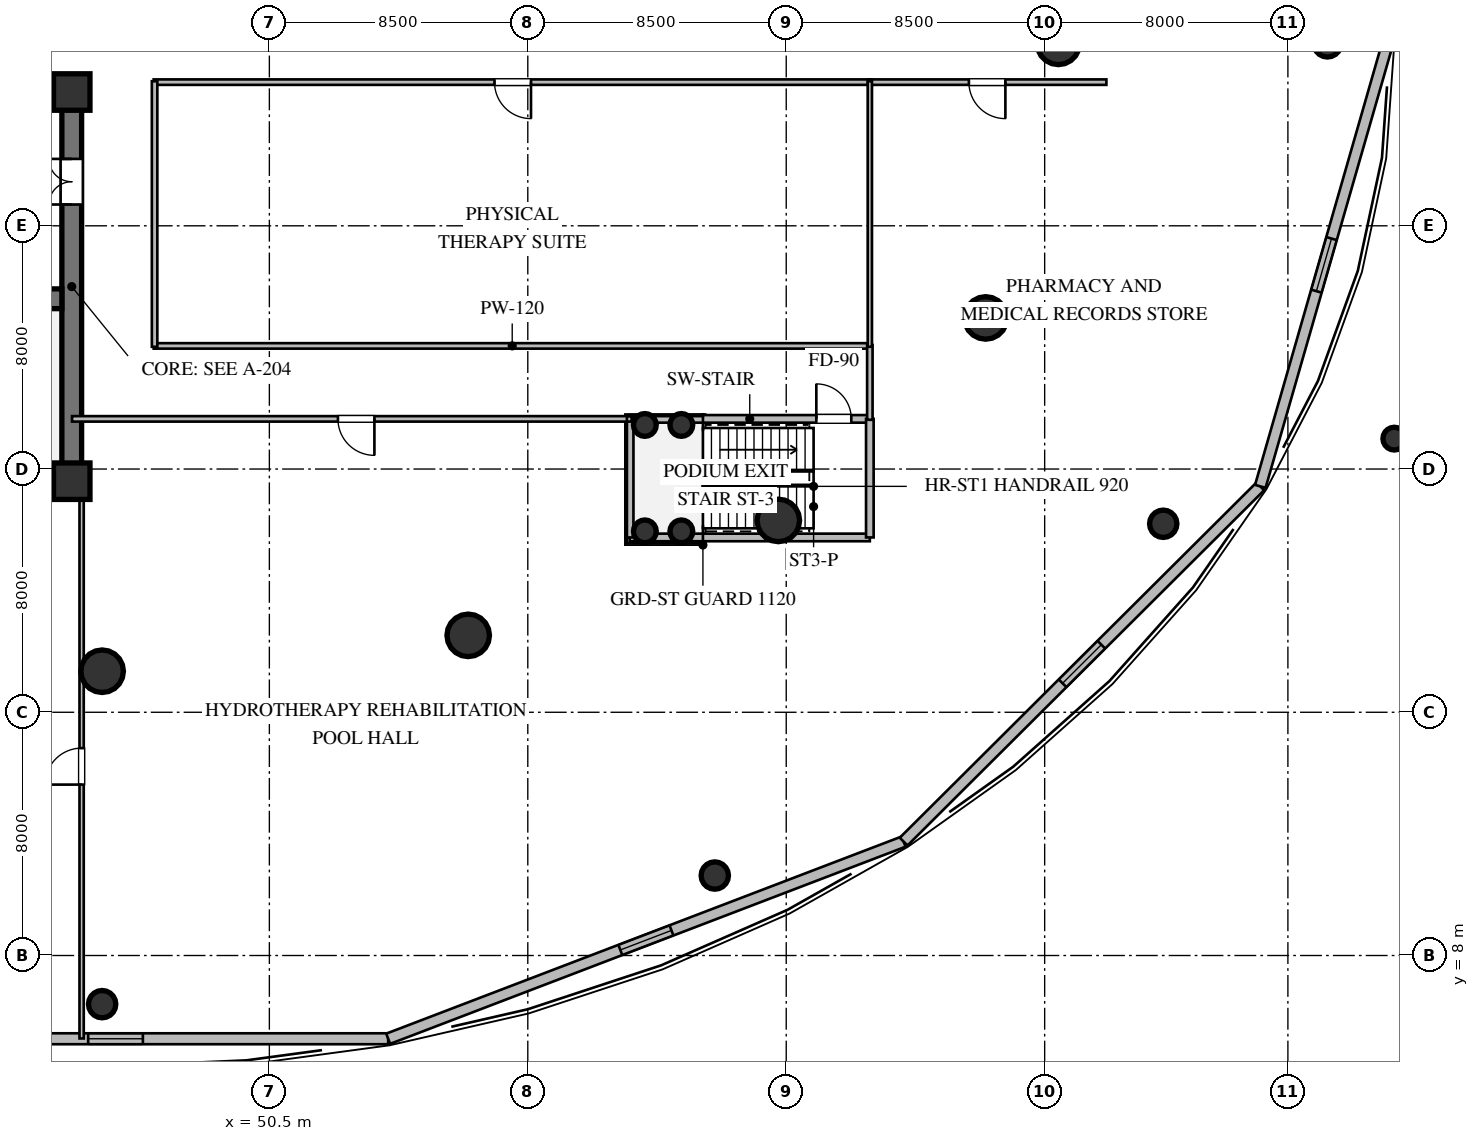
"""IFC4 building model, lengths in metres.
Left out: names, types, materials, properties, quantities, classifications, styles, units other than length and angle.
Written with IfcOpenShell. Run it as: python <this file> out.ifc"""

import sys

from ifc_helpers import new_model, si_unit, direction, frame, frame_2d, origin, origin_2d, place, context, subcontext, project, spatial, rectangle, circle, extrude, element, fill, save


model = new_model("IFC4")
c1 = context("Model", 3, precision=1e-05, world=origin(), true_north=direction((0.0, 1.0)))
c2 = subcontext(c1, "Body", "Model", "MODEL_VIEW")
j1 = project(units=[si_unit("LENGTHUNIT", "METRE"), si_unit("PLANEANGLEUNIT", "RADIAN")], contexts=[c1])
p1 = place(None, origin())
s1 = spatial("IfcSite", under=j1, at=p1, CompositionType="ELEMENT")
p2 = place(p1, origin())
s2 = spatial("IfcBuilding", under=s1, at=p2, CompositionType="ELEMENT")
p3 = place(p2, frame((0.0, 0.0, 9.6)))
s3 = spatial("IfcBuildingStorey", under=s2, at=p3, CompositionType="ELEMENT", Elevation=9.6)
for number, where, z_axis, x_axis in (
    (1, (21.675, 23.6, 0.0), (0.0, 0.0, 1.0), (1.0, 0.0, 0.0)),
    (2, (21.675, 36.4, 0.0), (0.0, 0.0, 1.0), (1.0, 0.0, 0.0)),
):
    element("IfcWall", number, at=place(p3, frame(where, z_axis=z_axis, x_axis=x_axis)), inside=s3, PredefinedType="SHEAR", context=c2, shape_type="SweptSolid", body=[
        extrude(rectangle(XDim=22.65, YDim=0.65, at=frame_2d((11.325, 0.0))), origin(), (0.0, 0.0, 1.0), 4.52),
    ])
p4 = place(p3, frame((44.0, 23.925, 0.0), z_axis=(0.0, 0.0, 1.0), x_axis=(0.0, 1.0, 0.0)))
e3 = element("IfcWall", 3, at=p4, inside=s3, PredefinedType="SHEAR", context=c2, shape_type="SweptSolid", body=[
    extrude(rectangle(XDim=12.15, YDim=0.65, at=frame_2d((6.075, 0.0))), origin(), (0.0, 0.0, 1.0), 4.52),
])
p5 = place(p4, frame((8.775, 0.0, 0.0)))
e4 = element("IfcOpeningElement", 4, at=p5, cuts=e3, PredefinedType="OPENING", context=c2, shape_type="SweptSolid", body=[
    extrude(rectangle(XDim=1.5, YDim=2.15, at=frame_2d((0.75, 1.075))), frame((0.0, 0.335, 0.0), z_axis=(0.0, -1.0, 0.0), x_axis=(1.0, 0.0, 0.0)), (0.0, 0.0, 1.0), 0.67),
])
p6 = place(p3, frame((22.325, 29.6, 0.0), z_axis=(0.0, 0.0, 1.0), x_axis=(1.0, 0.0, 0.0)))
e5 = element("IfcWall", 5, at=p6, inside=s3, PredefinedType="SHEAR", context=c2, shape_type="SweptSolid", body=[
    extrude(rectangle(XDim=21.35, YDim=0.65, at=frame_2d((10.675, 0.0))), origin(), (0.0, 0.0, 1.0), 4.52),
])
p7 = place(p6, frame((12.125, 0.0, 0.0)))
e6 = element("IfcOpeningElement", 6, at=p7, cuts=e5, PredefinedType="OPENING", context=c2, shape_type="SweptSolid", body=[
    extrude(rectangle(XDim=1.15, YDim=2.1, at=frame_2d((0.575, 1.05))), frame((0.0, 0.335, 0.0), z_axis=(0.0, -1.0, 0.0), x_axis=(1.0, 0.0, 0.0)), (0.0, 0.0, 1.0), 0.67),
])
for number, where, z_axis, x_axis in (
    (7, (44.0, 23.6, 0.0), (0.0, 0.0, 1.0), (1.0, 0.0, 0.0)),
    (8, (44.0, 36.4, 0.0), (0.0, 0.0, 1.0), (1.0, 0.0, 0.0)),
):
    element("IfcColumn", number, at=place(p3, frame(where, z_axis=z_axis, x_axis=x_axis)), inside=s3, PredefinedType="COLUMN", context=c2, shape_type="SweptSolid", body=[
        extrude(rectangle(XDim=1.2, YDim=1.2, at=origin_2d()), origin(), (0.0, 0.0, 1.0), 4.8),
    ])
for number, where, z_axis, x_axis in (
    (9, (76.45, 38.0, 0.0), (0.0, 0.0, 1.0), (1.0, 0.0, 0.0)),
    (10, (45.0, 17.35, 0.0), (0.0, 0.0, 1.0), (1.0, 0.0, 0.0)),
    (11, (57.04, 18.53, 0.0), (0.0, 0.0, 1.0), (1.0, 0.0, 0.0)),
    (12, (67.24, 22.31, 0.0), (0.0, 0.0, 1.0), (1.0, 0.0, 0.0)),
    (13, (74.06, 28.97, 0.0), (0.0, 0.0, 1.0), (1.0, 0.0, 0.0)),
):
    element("IfcColumn", number, at=place(p3, frame(where, z_axis=z_axis, x_axis=x_axis)), inside=s3, PredefinedType="COLUMN", context=c2, shape_type="SweptSolid", body=[
        extrude(circle(Radius=0.7, at=origin_2d()), origin(), (0.0, 0.0, 1.0), 4.8),
    ])
for number, where, z_axis, x_axis in (
    (14, (85.3, 38.0, 0.0), (0.0, 0.0, 1.0), (1.0, 0.0, 0.0)),
    (15, (45.0, 6.4, 0.0), (0.0, 0.0, 1.0), (1.0, 0.0, 0.0)),
    (16, (65.15, 10.63, 0.0), (0.0, 0.0, 1.0), (1.0, 0.0, 0.0)),
    (17, (79.9, 22.2, 0.0), (0.0, 0.0, 1.0), (1.0, 0.0, 0.0)),
):
    element("IfcColumn", number, at=place(p3, frame(where, z_axis=z_axis, x_axis=x_axis)), inside=s3, PredefinedType="COLUMN", context=c2, shape_type="SweptSolid", body=[
        extrude(circle(Radius=0.45, at=origin_2d()), origin(), (0.0, 0.0, 1.0), 4.8),
    ])
for number, where, z_axis, x_axis in (
    (18, (87.5, 25.0, 0.0), (0.0, 0.0, 1.0), (1.0, 0.0, 0.0)),
    (19, (62.85, 21.95, 0.0), (0.0, 0.0, 1.0), (1.0, 0.0, 0.0)),
    (20, (62.85, 25.45, 0.0), (0.0, 0.0, 1.0), (1.0, 0.0, 0.0)),
    (21, (64.05, 21.95, 0.0), (0.0, 0.0, 1.0), (1.0, 0.0, 0.0)),
    (22, (64.05, 25.45, 0.0), (0.0, 0.0, 1.0), (1.0, 0.0, 0.0)),
):
    element("IfcColumn", number, at=place(p3, frame(where, z_axis=z_axis, x_axis=x_axis)), inside=s3, PredefinedType="COLUMN", context=c2, shape_type="SweptSolid", body=[
        extrude(circle(Radius=0.375, at=origin_2d()), origin(), (0.0, 0.0, 1.0), 4.8),
    ])
p8 = place(p3, frame((35.592, 5.262, 0.0), z_axis=(0.0, 0.0, 1.0), x_axis=(1.0, 0.0, 0.0)))
e23 = element("IfcWall", 23, at=p8, inside=s3, PredefinedType="STANDARD", context=c2, shape_type="SweptSolid", body=[
    extrude(rectangle(XDim=18.816, YDim=0.36, at=frame_2d((9.408, 0.0))), origin(), (0.0, 0.0, 1.0), 4.52),
])
p9 = place(p8, frame((8.948, 0.0, 1.05)))
e24 = element("IfcOpeningElement", 24, at=p9, cuts=e23, PredefinedType="OPENING", context=c2, shape_type="SweptSolid", body=[
    extrude(rectangle(XDim=1.8, YDim=1.7, at=frame_2d((0.9, 0.85))), frame((0.0, 0.19, 0.0), z_axis=(0.0, -1.0, 0.0), x_axis=(1.0, 0.0, 0.0)), (0.0, 0.0, 1.0), 0.38),
])
p10 = place(p3, frame((54.408, 5.262, 0.0), z_axis=(0.0, 0.0, 1.0), x_axis=(0.934014086565, 0.357236176917, 0.0)))
e25 = element("IfcWall", 25, at=p10, inside=s3, PredefinedType="STANDARD", context=c2, shape_type="SweptSolid", body=[
    extrude(rectangle(XDim=18.151, YDim=0.36, at=frame_2d((9.075, 0.0))), origin(), (0.0, 0.0, 1.0), 4.52),
])
p11 = place(p10, frame((8.175, 0.0, 1.05)))
e26 = element("IfcOpeningElement", 26, at=p11, cuts=e25, PredefinedType="OPENING", context=c2, shape_type="SweptSolid", body=[
    extrude(rectangle(XDim=1.8, YDim=1.7, at=frame_2d((0.9, 0.85))), frame((0.0, 0.19, 0.0), z_axis=(0.0, -1.0, 0.0), x_axis=(1.0, 0.0, 0.0)), (0.0, 0.0, 1.0), 0.38),
])
p12 = place(p3, frame((71.361, 11.746, 0.0), z_axis=(0.0, 0.0, 1.0), x_axis=(0.708557675059, 0.705652904135, 0.0)))
e27 = element("IfcWall", 27, at=p12, inside=s3, PredefinedType="STANDARD", context=c2, shape_type="SweptSolid", body=[
    extrude(rectangle(XDim=16.557, YDim=0.36, at=frame_2d((8.279, 0.0))), origin(), (0.0, 0.0, 1.0), 4.52),
])
p13 = place(p12, frame((7.379, 0.0, 1.05)))
e28 = element("IfcOpeningElement", 28, at=p13, cuts=e27, PredefinedType="OPENING", context=c2, shape_type="SweptSolid", body=[
    extrude(rectangle(XDim=1.8, YDim=1.7, at=frame_2d((0.9, 0.85))), frame((0.0, 0.19, 0.0), z_axis=(0.0, -1.0, 0.0), x_axis=(1.0, 0.0, 0.0)), (0.0, 0.0, 1.0), 0.38),
])
p14 = place(p3, frame((83.093, 23.43, 0.0), z_axis=(0.0, 0.0, 1.0), x_axis=(0.276192699339, 0.961102280109, 0.0)))
e29 = element("IfcWall", 29, at=p14, inside=s3, PredefinedType="STANDARD", context=c2, shape_type="SweptSolid", body=[
    extrude(rectangle(XDim=15.16, YDim=0.36, at=frame_2d((7.58, 0.0))), origin(), (0.0, 0.0, 1.0), 4.52),
])
p15 = place(p14, frame((6.68, 0.0, 1.05)))
e30 = element("IfcOpeningElement", 30, at=p15, cuts=e29, PredefinedType="OPENING", context=c2, shape_type="SweptSolid", body=[
    extrude(rectangle(XDim=1.8, YDim=1.7, at=frame_2d((0.9, 0.85))), frame((0.0, 0.19, 0.0), z_axis=(0.0, -1.0, 0.0), x_axis=(1.0, 0.0, 0.0)), (0.0, 0.0, 1.0), 0.38),
])
p16 = place(p3, frame((62.35, 25.65, 0.0), z_axis=(0.0, 0.0, 1.0), x_axis=(1.0, 0.0, 0.0)))
e31 = element("IfcWall", 31, at=p16, inside=s3, PredefinedType="SOLIDWALL", context=c2, shape_type="SweptSolid", body=[
    extrude(rectangle(XDim=7.9, YDim=0.25, at=frame_2d((3.95, 0.0))), origin(), (0.0, 0.0, 1.0), 4.52),
])
p17 = place(p16, frame((6.14, 0.0, 0.0)))
e32 = element("IfcOpeningElement", 32, at=p17, cuts=e31, PredefinedType="OPENING", context=c2, shape_type="SweptSolid", body=[
    extrude(rectangle(XDim=1.15, YDim=2.1, at=frame_2d((0.575, 1.05))), frame((0.0, 0.135, 0.0), z_axis=(0.0, -1.0, 0.0), x_axis=(1.0, 0.0, 0.0)), (0.0, 0.0, 1.0), 0.27),
])
p18 = place(p3, frame((62.35, 21.75, 0.0), z_axis=(0.0, 0.0, 1.0), x_axis=(1.0, 0.0, 0.0)))
e33 = element("IfcWall", 33, at=p18, inside=s3, PredefinedType="SOLIDWALL", context=c2, shape_type="SweptSolid", body=[
    extrude(rectangle(XDim=7.9, YDim=0.25, at=frame_2d((3.95, 0.0))), origin(), (0.0, 0.0, 1.0), 4.52),
])
p19 = place(p3, frame((62.35, 21.75, 0.0), z_axis=(0.0, 0.0, 1.0), x_axis=(0.0, 1.0, 0.0)))
e34 = element("IfcWall", 34, at=p19, inside=s3, PredefinedType="SOLIDWALL", context=c2, shape_type="SweptSolid", body=[
    extrude(rectangle(XDim=3.9, YDim=0.25, at=frame_2d((1.95, 0.0))), origin(), (0.0, 0.0, 1.0), 1.887),
])
p20 = place(p3, frame((70.25, 21.75, 0.0), z_axis=(0.0, 0.0, 1.0), x_axis=(0.0, 1.0, 0.0)))
e35 = element("IfcWall", 35, at=p20, inside=s3, PredefinedType="SOLIDWALL", context=c2, shape_type="SweptSolid", body=[
    extrude(rectangle(XDim=3.9, YDim=0.25, at=frame_2d((1.95, 0.0))), origin(), (0.0, 0.0, 1.0), 4.52),
])
p21 = place(p3, frame((62.415, 25.65, 0.0), z_axis=(0.0, 0.0, 1.0), x_axis=(-1.0, 0.0, 0.0)))
e36 = element("IfcWall", 36, at=p21, inside=s3, PredefinedType="PARTITIONING", context=c2, shape_type="SweptSolid", body=[
    extrude(rectangle(XDim=18.405, YDim=0.18, at=frame_2d((9.203, 0.0))), origin(), (0.0, 0.0, 1.0), 3.966),
])
p22 = place(p21, frame((8.46, 0.0, 0.0)))
e37 = element("IfcOpeningElement", 37, at=p22, cuts=e36, PredefinedType="OPENING", context=c2, shape_type="SweptSolid", body=[
    extrude(rectangle(XDim=1.2, YDim=2.15, at=frame_2d((0.6, 1.075))), frame((0.0, 0.1, 0.0), z_axis=(0.0, -1.0, 0.0), x_axis=(1.0, 0.0, 0.0)), (0.0, 0.0, 1.0), 0.2),
])
p23 = place(p3, frame((70.315, 36.725, 0.0), z_axis=(0.0, 0.0, 1.0), x_axis=(-1.0, 0.0, 0.0)))
e38 = element("IfcWall", 38, at=p23, inside=s3, PredefinedType="PARTITIONING", context=c2, shape_type="SweptSolid", body=[
    extrude(rectangle(XDim=23.62, YDim=0.18, at=frame_2d((11.81, 0.0))), origin(), (0.0, 0.0, 1.0), 3.966),
])
p24 = place(p23, frame((11.21, 0.0, 0.0)))
e39 = element("IfcOpeningElement", 39, at=p24, cuts=e38, PredefinedType="OPENING", context=c2, shape_type="SweptSolid", body=[
    extrude(rectangle(XDim=1.2, YDim=2.15, at=frame_2d((0.6, 1.075))), frame((0.0, 0.1, 0.0), z_axis=(0.0, -1.0, 0.0), x_axis=(1.0, 0.0, 0.0)), (0.0, 0.0, 1.0), 0.2),
])
p25 = place(p3, frame((46.695, 28.05, 0.0), z_axis=(0.0, 0.0, 1.0), x_axis=(1.0, 0.0, 0.0)))
e40 = element("IfcWall", 40, at=p25, inside=s3, PredefinedType="PARTITIONING", context=c2, shape_type="SweptSolid", body=[
    extrude(rectangle(XDim=23.585, YDim=0.18, at=frame_2d((11.792, 0.0))), origin(), (0.0, 0.0, 1.0), 3.966),
])
p26 = place(p3, frame((46.725, 36.755, 0.0), z_axis=(0.0, 0.0, 1.0), x_axis=(0.0, -1.0, 0.0)))
e41 = element("IfcWall", 41, at=p26, inside=s3, PredefinedType="PARTITIONING", context=c2, shape_type="SweptSolid", body=[
    extrude(rectangle(XDim=8.735, YDim=0.18, at=frame_2d((4.367, 0.0))), origin(), (0.0, 0.0, 1.0), 4.52),
])
p27 = place(p3, frame((78.03, 36.725, 0.0), z_axis=(0.0, 0.0, 1.0), x_axis=(-1.0, 0.0, 0.0)))
e42 = element("IfcWall", 42, at=p27, inside=s3, PredefinedType="PARTITIONING", context=c2, shape_type="SweptSolid", body=[
    extrude(rectangle(XDim=7.845, YDim=0.18, at=frame_2d((3.922, 0.0))), origin(), (0.0, 0.0, 1.0), 4.52),
])
p28 = place(p27, frame((3.322, 0.0, 0.0)))
e43 = element("IfcOpeningElement", 43, at=p28, cuts=e42, PredefinedType="OPENING", context=c2, shape_type="SweptSolid", body=[
    extrude(rectangle(XDim=1.2, YDim=2.15, at=frame_2d((0.6, 1.075))), frame((0.0, 0.1, 0.0), z_axis=(0.0, -1.0, 0.0), x_axis=(1.0, 0.0, 0.0)), (0.0, 0.0, 1.0), 0.2),
])
p29 = place(p3, frame((70.25, 28.08, 0.0), z_axis=(0.0, 0.0, 1.0), x_axis=(0.0, -1.0, 0.0)))
e44 = element("IfcWall", 44, at=p29, inside=s3, PredefinedType="PARTITIONING", context=c2, shape_type="SweptSolid", body=[
    extrude(rectangle(XDim=2.46, YDim=0.18, at=frame_2d((1.23, 0.0))), origin(), (0.0, 0.0, 1.0), 4.52),
])
p30 = place(p3, frame((44.325, 5.272, 0.0), z_axis=(0.0, 0.0, 1.0), x_axis=(0.0, 1.0, 0.0)))
e45 = element("IfcWall", 45, at=p30, inside=s3, PredefinedType="PARTITIONING", context=c2, shape_type="SweptSolid", body=[
    extrude(rectangle(XDim=18.318, YDim=0.14, at=frame_2d((9.159, 0.0))), origin(), (0.0, 0.0, 1.0), 3.66),
])
p31 = place(p30, frame((8.349, 0.0, 0.0)))
e46 = element("IfcOpeningElement", 46, at=p31, cuts=e45, PredefinedType="OPENING", context=c2, shape_type="SweptSolid", body=[
    extrude(rectangle(XDim=1.2, YDim=2.15, at=frame_2d((0.6, 1.075))), frame((0.0, 0.08, 0.0), z_axis=(0.0, -1.0, 0.0), x_axis=(1.0, 0.0, 0.0)), (0.0, 0.0, 1.0), 0.16),
])
p32 = place(p3, frame((70.25, 36.755, 0.0), z_axis=(0.0, 0.0, 1.0), x_axis=(0.0, -1.0, 0.0)))
e47 = element("IfcWall", 47, at=p32, inside=s3, PredefinedType="PARTITIONING", context=c2, shape_type="SweptSolid", body=[
    extrude(rectangle(XDim=8.735, YDim=0.14, at=frame_2d((4.367, 0.0))), origin(), (0.0, 0.0, 1.0), 4.52),
])
p33 = place(p9, origin())
e48 = element("IfcWindow", 48, at=p33, inside=s3, PartitioningType="SINGLE_PANEL", PredefinedType="WINDOW", context=c2, shape_type="SweptSolid", body=[
    extrude(rectangle(XDim=1.8, YDim=1.7, at=frame_2d((0.9, 0.85))), frame((0.0, 0.03, 0.0), z_axis=(0.0, -1.0, 0.0), x_axis=(1.0, 0.0, 0.0)), (0.0, 0.0, 1.0), 0.06),
])
fill(e24, e48)
p34 = place(p11, origin())
e49 = element("IfcWindow", 49, at=p34, inside=s3, PartitioningType="SINGLE_PANEL", PredefinedType="WINDOW", context=c2, shape_type="SweptSolid", body=[
    extrude(rectangle(XDim=1.8, YDim=1.7, at=frame_2d((0.9, 0.85))), frame((0.0, 0.03, 0.0), z_axis=(0.0, -1.0, 0.0), x_axis=(1.0, 0.0, 0.0)), (0.0, 0.0, 1.0), 0.06),
])
fill(e26, e49)
p35 = place(p13, origin())
e50 = element("IfcWindow", 50, at=p35, inside=s3, PartitioningType="SINGLE_PANEL", PredefinedType="WINDOW", context=c2, shape_type="SweptSolid", body=[
    extrude(rectangle(XDim=1.8, YDim=1.7, at=frame_2d((0.9, 0.85))), frame((0.0, 0.03, 0.0), z_axis=(0.0, -1.0, 0.0), x_axis=(1.0, 0.0, 0.0)), (0.0, 0.0, 1.0), 0.06),
])
fill(e28, e50)
p36 = place(p15, origin())
e51 = element("IfcWindow", 51, at=p36, inside=s3, PartitioningType="SINGLE_PANEL", PredefinedType="WINDOW", context=c2, shape_type="SweptSolid", body=[
    extrude(rectangle(XDim=1.8, YDim=1.7, at=frame_2d((0.9, 0.85))), frame((0.0, 0.03, 0.0), z_axis=(0.0, -1.0, 0.0), x_axis=(1.0, 0.0, 0.0)), (0.0, 0.0, 1.0), 0.06),
])
fill(e30, e51)
p37 = place(p5, origin())
e52 = element("IfcDoor", 52, at=p37, inside=s3, OperationType="DOUBLE_DOOR_SINGLE_SWING", PredefinedType="DOOR", context=c2, shape_type="SweptSolid", body=[
    extrude(rectangle(XDim=1.5, YDim=2.15, at=frame_2d((0.75, 1.075))), frame((0.0, 0.025, 0.0), z_axis=(0.0, -1.0, 0.0), x_axis=(1.0, 0.0, 0.0)), (0.0, 0.0, 1.0), 0.05),
])
fill(e4, e52)
p38 = place(p17, origin())
e53 = element("IfcDoor", 53, at=p38, inside=s3, OperationType="SINGLE_SWING_LEFT", PredefinedType="DOOR", context=c2, shape_type="SweptSolid", body=[
    extrude(rectangle(XDim=1.15, YDim=2.1, at=frame_2d((0.575, 1.05))), frame((0.0, 0.025, 0.0), z_axis=(0.0, -1.0, 0.0), x_axis=(1.0, 0.0, 0.0)), (0.0, 0.0, 1.0), 0.05),
])
fill(e32, e53)
p39 = place(p22, origin())
e54 = element("IfcDoor", 54, at=p39, inside=s3, OperationType="SINGLE_SWING_LEFT", PredefinedType="DOOR", context=c2, shape_type="SweptSolid", body=[
    extrude(rectangle(XDim=1.2, YDim=2.15, at=frame_2d((0.6, 1.075))), frame((0.0, 0.025, 0.0), z_axis=(0.0, -1.0, 0.0), x_axis=(1.0, 0.0, 0.0)), (0.0, 0.0, 1.0), 0.05),
])
fill(e37, e54)
p40 = place(p24, origin())
e55 = element("IfcDoor", 55, at=p40, inside=s3, OperationType="SINGLE_SWING_LEFT", PredefinedType="DOOR", context=c2, shape_type="SweptSolid", body=[
    extrude(rectangle(XDim=1.2, YDim=2.15, at=frame_2d((0.6, 1.075))), frame((0.0, 0.025, 0.0), z_axis=(0.0, -1.0, 0.0), x_axis=(1.0, 0.0, 0.0)), (0.0, 0.0, 1.0), 0.05),
])
fill(e39, e55)
p41 = place(p28, origin())
e56 = element("IfcDoor", 56, at=p41, inside=s3, OperationType="SINGLE_SWING_LEFT", PredefinedType="DOOR", context=c2, shape_type="SweptSolid", body=[
    extrude(rectangle(XDim=1.2, YDim=2.15, at=frame_2d((0.6, 1.075))), frame((0.0, 0.025, 0.0), z_axis=(0.0, -1.0, 0.0), x_axis=(1.0, 0.0, 0.0)), (0.0, 0.0, 1.0), 0.05),
])
fill(e43, e56)
p42 = place(p31, origin())
e57 = element("IfcDoor", 57, at=p42, inside=s3, OperationType="SINGLE_SWING_LEFT", PredefinedType="DOOR", context=c2, shape_type="SweptSolid", body=[
    extrude(rectangle(XDim=1.2, YDim=2.15, at=frame_2d((0.6, 1.075))), frame((0.0, 0.025, 0.0), z_axis=(0.0, -1.0, 0.0), x_axis=(1.0, 0.0, 0.0)), (0.0, 0.0, 1.0), 0.05),
])
fill(e46, e57)
save(model, sys.argv[1])
